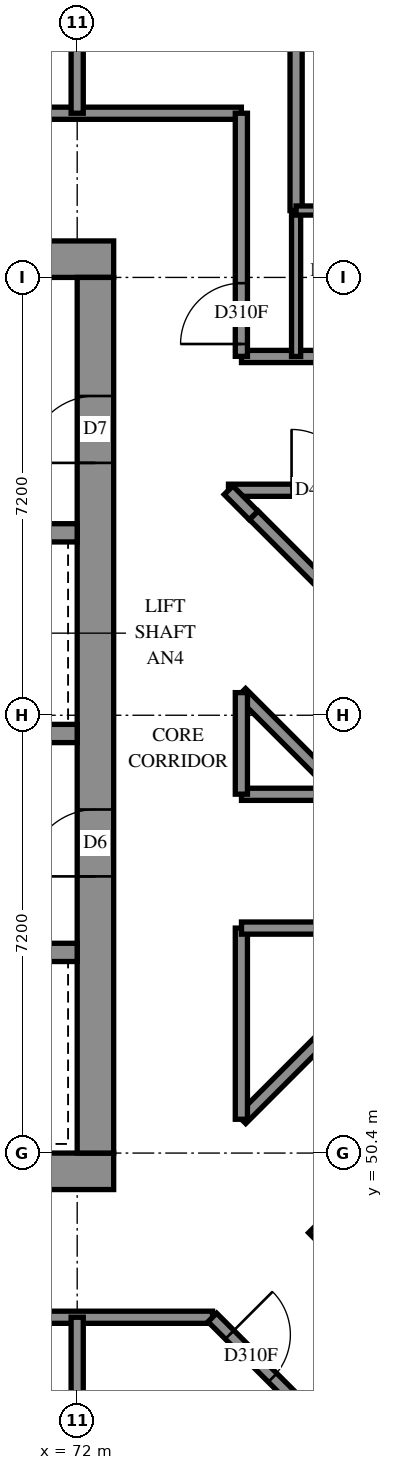
"""IFC4 building model, lengths in metres.
Left out: names, types, materials, properties, quantities, classifications, styles, units other than length and angle.
Written with IfcOpenShell. Run it as: python <this file> out.ifc"""

import sys

from ifc_helpers import new_model, si_unit, direction, frame, frame_2d, origin, place, context, subcontext, project, spatial, rectangle, extrude, element, fill, save


model = new_model("IFC4")
c1 = context("Model", 3, precision=1e-05, world=origin(), true_north=direction((0.0, 1.0)))
c2 = subcontext(c1, "Body", "Model", "MODEL_VIEW")
j1 = project(units=[si_unit("LENGTHUNIT", "METRE"), si_unit("PLANEANGLEUNIT", "RADIAN")], contexts=[c1])
p1 = place(None, origin())
s1 = spatial("IfcSite", under=j1, at=p1, CompositionType="ELEMENT")
p2 = place(p1, origin())
s2 = spatial("IfcBuilding", under=s1, at=p2, CompositionType="ELEMENT")
p3 = place(p2, frame((0.0, 0.0, 159.2)))
s3 = spatial("IfcBuildingStorey", under=s2, at=p3, CompositionType="ELEMENT", Elevation=159.2)
p4 = place(p3, frame((57.0, 50.1, -0.3), z_axis=(0.0, 0.0, 1.0), x_axis=(1.0, 0.0, 0.0)))
e1 = element("IfcWall", 1, at=p4, inside=s3, PredefinedType="SHEAR", context=c2, shape_type="SweptSolid", body=[
    extrude(rectangle(XDim=15.6, YDim=0.6, at=frame_2d((7.8, 0.0))), origin(), (0.0, 0.0, 1.0), 2.7),
])
p5 = place(p3, frame((57.0, 65.1, -0.3), z_axis=(0.0, 0.0, 1.0), x_axis=(1.0, 0.0, 0.0)))
e2 = element("IfcWall", 2, at=p5, inside=s3, PredefinedType="SHEAR", context=c2, shape_type="SweptSolid", body=[
    extrude(rectangle(XDim=15.6, YDim=0.6, at=frame_2d((7.8, 0.0))), origin(), (0.0, 0.0, 1.0), 2.7),
])
p6 = place(p5, frame((10.6, 0.0, 0.3)))
e3 = element("IfcOpeningElement", 3, at=p6, cuts=e2, PredefinedType="OPENING", context=c2, shape_type="SweptSolid", body=[
    extrude(rectangle(XDim=0.8, YDim=2.1, at=frame_2d((0.4, 1.05))), frame((0.0, 0.31, 0.0), z_axis=(0.0, -1.0, 0.0), x_axis=(1.0, 0.0, 0.0)), (0.0, 0.0, 1.0), 0.62),
])
p7 = place(p3, frame((72.3, 50.4, -0.3), z_axis=(0.0, 0.0, 1.0), x_axis=(0.0, 1.0, 0.0)))
e4 = element("IfcWall", 4, at=p7, inside=s3, PredefinedType="SHEAR", context=c2, shape_type="SweptSolid", body=[
    extrude(rectangle(XDim=14.4, YDim=0.6, at=frame_2d((7.2, 0.0))), origin(), (0.0, 0.0, 1.0), 2.7),
])
p8 = place(p7, frame((4.55, 0.0, 0.3)))
e5 = element("IfcOpeningElement", 5, at=p8, cuts=e4, PredefinedType="OPENING", context=c2, shape_type="SweptSolid", body=[
    extrude(rectangle(XDim=1.1, YDim=2.1, at=frame_2d((0.55, 1.05))), frame((0.0, 0.31, 0.0), z_axis=(0.0, -1.0, 0.0), x_axis=(1.0, 0.0, 0.0)), (0.0, 0.0, 1.0), 0.62),
])
p9 = place(p7, frame((11.35, 0.0, 0.3)))
e6 = element("IfcOpeningElement", 6, at=p9, cuts=e4, PredefinedType="OPENING", context=c2, shape_type="SweptSolid", body=[
    extrude(rectangle(XDim=1.1, YDim=2.1, at=frame_2d((0.55, 1.05))), frame((0.0, 0.31, 0.0), z_axis=(0.0, -1.0, 0.0), x_axis=(1.0, 0.0, 0.0)), (0.0, 0.0, 1.0), 0.62),
])
p10 = place(p3, frame((57.6, 53.7, 0.0), z_axis=(0.0, 0.0, 1.0), x_axis=(1.0, 0.0, 0.0)))
e7 = element("IfcWall", 7, at=p10, inside=s3, PredefinedType="SOLIDWALL", context=c2, shape_type="SweptSolid", body=[
    extrude(rectangle(XDim=14.4, YDim=0.3, at=frame_2d((7.2, 0.0))), origin(), (0.0, 0.0, 1.0), 3.1),
])
p11 = place(p10, frame((1.35, 0.0, 0.0)))
e8 = element("IfcOpeningElement", 8, at=p11, cuts=e7, PredefinedType="OPENING", context=c2, shape_type="SweptSolid", body=[
    extrude(rectangle(XDim=0.9, YDim=2.1, at=frame_2d((0.45, 1.05))), frame((0.0, 0.16, 0.0), z_axis=(0.0, -1.0, 0.0), x_axis=(1.0, 0.0, 0.0)), (0.0, 0.0, 1.0), 0.32),
])
p12 = place(p10, frame((4.95, 0.0, 0.0)))
e9 = element("IfcOpeningElement", 9, at=p12, cuts=e7, PredefinedType="OPENING", context=c2, shape_type="SweptSolid", body=[
    extrude(rectangle(XDim=0.9, YDim=2.1, at=frame_2d((0.45, 1.05))), frame((0.0, 0.16, 0.0), z_axis=(0.0, -1.0, 0.0), x_axis=(1.0, 0.0, 0.0)), (0.0, 0.0, 1.0), 0.32),
])
p13 = place(p10, frame((8.55, 0.0, 0.0)))
e10 = element("IfcOpeningElement", 10, at=p13, cuts=e7, PredefinedType="OPENING", context=c2, shape_type="SweptSolid", body=[
    extrude(rectangle(XDim=0.9, YDim=2.1, at=frame_2d((0.45, 1.05))), frame((0.0, 0.16, 0.0), z_axis=(0.0, -1.0, 0.0), x_axis=(1.0, 0.0, 0.0)), (0.0, 0.0, 1.0), 0.32),
])
p14 = place(p10, frame((12.05, 0.0, 0.0)))
e11 = element("IfcOpeningElement", 11, at=p14, cuts=e7, PredefinedType="OPENING", context=c2, shape_type="SweptSolid", body=[
    extrude(rectangle(XDim=1.1, YDim=2.1, at=frame_2d((0.55, 1.05))), frame((0.0, 0.16, 0.0), z_axis=(0.0, -1.0, 0.0), x_axis=(1.0, 0.0, 0.0)), (0.0, 0.0, 1.0), 0.32),
])
p15 = place(p3, frame((57.6, 57.3, 0.0), z_axis=(0.0, 0.0, 1.0), x_axis=(1.0, 0.0, 0.0)))
e12 = element("IfcWall", 12, at=p15, inside=s3, PredefinedType="SOLIDWALL", context=c2, shape_type="SweptSolid", body=[
    extrude(rectangle(XDim=14.4, YDim=0.3, at=frame_2d((7.2, 0.0))), origin(), (0.0, 0.0, 1.0), 3.1),
])
p16 = place(p15, frame((1.25, 0.0, 0.0)))
e13 = element("IfcOpeningElement", 13, at=p16, cuts=e12, PredefinedType="OPENING", context=c2, shape_type="SweptSolid", body=[
    extrude(rectangle(XDim=1.1, YDim=2.1, at=frame_2d((0.55, 1.05))), frame((0.0, 0.16, 0.0), z_axis=(0.0, -1.0, 0.0), x_axis=(1.0, 0.0, 0.0)), (0.0, 0.0, 1.0), 0.32),
])
p17 = place(p15, frame((4.85, 0.0, 0.0)))
e14 = element("IfcOpeningElement", 14, at=p17, cuts=e12, PredefinedType="OPENING", context=c2, shape_type="SweptSolid", body=[
    extrude(rectangle(XDim=1.1, YDim=2.1, at=frame_2d((0.55, 1.05))), frame((0.0, 0.16, 0.0), z_axis=(0.0, -1.0, 0.0), x_axis=(1.0, 0.0, 0.0)), (0.0, 0.0, 1.0), 0.32),
])
p18 = place(p15, frame((8.45, 0.0, 0.0)))
e15 = element("IfcOpeningElement", 15, at=p18, cuts=e12, PredefinedType="OPENING", context=c2, shape_type="SweptSolid", body=[
    extrude(rectangle(XDim=1.1, YDim=2.1, at=frame_2d((0.55, 1.05))), frame((0.0, 0.16, 0.0), z_axis=(0.0, -1.0, 0.0), x_axis=(1.0, 0.0, 0.0)), (0.0, 0.0, 1.0), 0.32),
])
p19 = place(p15, frame((12.05, 0.0, 0.0)))
e16 = element("IfcOpeningElement", 16, at=p19, cuts=e12, PredefinedType="OPENING", context=c2, shape_type="SweptSolid", body=[
    extrude(rectangle(XDim=1.1, YDim=2.1, at=frame_2d((0.55, 1.05))), frame((0.0, 0.16, 0.0), z_axis=(0.0, -1.0, 0.0), x_axis=(1.0, 0.0, 0.0)), (0.0, 0.0, 1.0), 0.32),
])
p20 = place(p3, frame((64.8, 60.6, 0.0), z_axis=(0.0, 0.0, 1.0), x_axis=(1.0, 0.0, 0.0)))
e17 = element("IfcWall", 17, at=p20, inside=s3, PredefinedType="SOLIDWALL", context=c2, shape_type="SweptSolid", body=[
    extrude(rectangle(XDim=7.2, YDim=0.3, at=frame_2d((3.6, 0.0))), origin(), (0.0, 0.0, 1.0), 3.1),
])
p21 = place(p3, frame((76.018, 49.302, -0.3), z_axis=(0.0, 0.0, 1.0), x_axis=(0.7071067812, -0.7071067812, 0.0)))
e18 = element("IfcWall", 18, at=p21, inside=s3, PredefinedType="SHEAR", context=c2, shape_type="SweptSolid", body=[
    extrude(rectangle(XDim=15.6, YDim=0.6, at=frame_2d((7.8, 0.0))), origin(), (0.0, 0.0, 1.0), 2.7),
])
p22 = place(p3, frame((54.9, 67.5, 0.0), z_axis=(0.0, 0.0, 1.0), x_axis=(1.0, 0.0, 0.0)))
e19 = element("IfcWall", 19, at=p22, inside=s3, PredefinedType="PARTITIONING", context=c2, shape_type="SweptSolid", body=[
    extrude(rectangle(XDim=19.8, YDim=0.2, at=frame_2d((9.9, 0.0))), origin(), (0.0, 0.0, 1.0), 3.1),
])
p23 = place(p22, frame((6.599, 0.0, 0.0)))
e20 = element("IfcOpeningElement", 20, at=p23, cuts=e19, PredefinedType="OPENING", context=c2, shape_type="SweptSolid", body=[
    extrude(rectangle(XDim=0.9, YDim=2.1, at=frame_2d((0.45, 1.05))), frame((0.0, 0.11, 0.0), z_axis=(0.0, -1.0, 0.0), x_axis=(1.0, 0.0, 0.0)), (0.0, 0.0, 1.0), 0.22),
])
p24 = place(p22, frame((13.799, 0.0, 0.0)))
e21 = element("IfcOpeningElement", 21, at=p24, cuts=e19, PredefinedType="OPENING", context=c2, shape_type="SweptSolid", body=[
    extrude(rectangle(XDim=0.9, YDim=2.1, at=frame_2d((0.45, 1.05))), frame((0.0, 0.11, 0.0), z_axis=(0.0, -1.0, 0.0), x_axis=(1.0, 0.0, 0.0)), (0.0, 0.0, 1.0), 0.22),
])
p25 = place(p3, frame((54.9, 47.7, 0.0), z_axis=(0.0, 0.0, 1.0), x_axis=(1.0, 0.0, 0.0)))
e22 = element("IfcWall", 22, at=p25, inside=s3, PredefinedType="PARTITIONING", context=c2, shape_type="SweptSolid", body=[
    extrude(rectangle(XDim=19.326, YDim=0.2, at=frame_2d((9.663, 0.0))), origin(), (0.0, 0.0, 1.0), 3.1),
])
p26 = place(p25, frame((6.599, 0.0, 0.0)))
e23 = element("IfcOpeningElement", 23, at=p26, cuts=e22, PredefinedType="OPENING", context=c2, shape_type="SweptSolid", body=[
    extrude(rectangle(XDim=0.9, YDim=2.1, at=frame_2d((0.45, 1.05))), frame((0.0, 0.11, 0.0), z_axis=(0.0, -1.0, 0.0), x_axis=(1.0, 0.0, 0.0)), (0.0, 0.0, 1.0), 0.22),
])
p27 = place(p25, frame((14.101, 0.0, 0.0)))
e24 = element("IfcOpeningElement", 24, at=p27, cuts=e22, PredefinedType="OPENING", context=c2, shape_type="SweptSolid", body=[
    extrude(rectangle(XDim=0.9, YDim=2.1, at=frame_2d((0.45, 1.05))), frame((0.0, 0.11, 0.0), z_axis=(0.0, -1.0, 0.0), x_axis=(1.0, 0.0, 0.0)), (0.0, 0.0, 1.0), 0.22),
])
p28 = place(p3, frame((75.6, 65.9, 0.0), z_axis=(0.0, 0.0, 1.0), x_axis=(0.0, 1.0, 0.0)))
e25 = element("IfcWall", 25, at=p28, inside=s3, PredefinedType="PARTITIONING", context=c2, shape_type="SweptSolid", body=[
    extrude(rectangle(XDim=6.897, YDim=0.2, at=frame_2d((3.448, 0.0))), origin(), (0.0, 0.0, 1.0), 3.1),
])
p29 = place(p3, frame((74.903, 60.889, 0.0), z_axis=(0.0, 0.0, 1.0), x_axis=(0.7071067812, -0.7071067812, 0.0)))
e26 = element("IfcWall", 26, at=p29, inside=s3, PredefinedType="PARTITIONING", context=c2, shape_type="SweptSolid", body=[
    extrude(rectangle(XDim=6.081, YDim=0.2, at=frame_2d((3.041, 0.0))), origin(), (0.0, 0.0, 1.0), 3.1),
])
p30 = place(p3, frame((74.488, 61.3, 0.0), z_axis=(0.0, 0.0, 1.0), x_axis=(1.0, 0.0, 0.0)))
e27 = element("IfcWall", 27, at=p30, inside=s3, PredefinedType="PARTITIONING", context=c2, shape_type="SweptSolid", body=[
    extrude(rectangle(XDim=4.712, YDim=0.2, at=frame_2d((2.356, 0.0))), origin(), (0.0, 0.0, 1.0), 3.1),
])
p31 = place(p30, frame((1.037, 0.0, 0.0)))
e28 = element("IfcOpeningElement", 28, at=p31, cuts=e27, PredefinedType="OPENING", context=c2, shape_type="SweptSolid", body=[
    extrude(rectangle(XDim=1.0, YDim=2.1, at=frame_2d((0.5, 1.05))), frame((0.0, 0.11, 0.0), z_axis=(0.0, -1.0, 0.0), x_axis=(1.0, 0.0, 0.0)), (0.0, 0.0, 1.0), 0.22),
])
p32 = place(p3, frame((74.223, 47.697, 0.0), z_axis=(0.0, 0.0, 1.0), x_axis=(0.7071067812, -0.7071067812, 0.0)))
e29 = element("IfcWall", 29, at=p32, inside=s3, PredefinedType="PARTITIONING", context=c2, shape_type="SweptSolid", body=[
    extrude(rectangle(XDim=4.63, YDim=0.2, at=frame_2d((2.315, 0.0))), origin(), (0.0, 0.0, 1.0), 3.1),
])
p33 = place(p32, frame((0.401, 0.0, 0.0)))
e30 = element("IfcOpeningElement", 30, at=p33, cuts=e29, PredefinedType="OPENING", context=c2, shape_type="SweptSolid", body=[
    extrude(rectangle(XDim=1.0, YDim=2.1, at=frame_2d((0.5, 1.05))), frame((0.0, 0.11, 0.0), z_axis=(0.0, -1.0, 0.0), x_axis=(1.0, 0.0, 0.0)), (0.0, 0.0, 1.0), 0.22),
])
p34 = place(p3, frame((74.702, 63.5, 0.0), z_axis=(0.0, 0.0, 1.0), x_axis=(1.0, 0.0, 0.0)))
e31 = element("IfcWall", 31, at=p34, inside=s3, PredefinedType="PARTITIONING", context=c2, shape_type="SweptSolid", body=[
    extrude(rectangle(XDim=4.498, YDim=0.2, at=frame_2d((2.249, 0.0))), origin(), (0.0, 0.0, 1.0), 3.1),
])
p35 = place(p34, frame((3.046, 0.0, 0.0)))
e32 = element("IfcOpeningElement", 32, at=p35, cuts=e31, PredefinedType="OPENING", context=c2, shape_type="SweptSolid", body=[
    extrude(rectangle(XDim=0.9, YDim=2.1, at=frame_2d((0.45, 1.05))), frame((0.0, 0.11, 0.0), z_axis=(0.0, -1.0, 0.0), x_axis=(1.0, 0.0, 0.0)), (0.0, 0.0, 1.0), 0.22),
])
p36 = place(p3, frame((74.701, 50.957, 0.0), z_axis=(0.0, 0.0, 1.0), x_axis=(0.7071067812, 0.7071067812, 0.0)))
e33 = element("IfcWall", 33, at=p36, inside=s3, PredefinedType="PARTITIONING", context=c2, shape_type="SweptSolid", body=[
    extrude(rectangle(XDim=4.444, YDim=0.2, at=frame_2d((2.222, 0.0))), origin(), (0.0, 0.0, 1.0), 3.1),
])
p37 = place(p3, frame((72.0, 67.5, 0.0), z_axis=(0.0, 0.0, 1.0), x_axis=(0.0, 1.0, 0.0)))
e34 = element("IfcWall", 34, at=p37, inside=s3, PredefinedType="PARTITIONING", context=c2, shape_type="SweptSolid", body=[
    extrude(rectangle(XDim=4.05, YDim=0.2, at=frame_2d((2.025, 0.0))), origin(), (0.0, 0.0, 1.0), 3.1),
])
p38 = place(p3, frame((74.7, 63.502, 0.0), z_axis=(0.0, 0.0, 1.0), x_axis=(0.0, 1.0, 0.0)))
e35 = element("IfcWall", 35, at=p38, inside=s3, PredefinedType="PARTITIONING", context=c2, shape_type="SweptSolid", body=[
    extrude(rectangle(XDim=3.998, YDim=0.2, at=frame_2d((1.999, 0.0))), origin(), (0.0, 0.0, 1.0), 3.1),
])
p39 = place(p38, frame((0.203, 0.0, 0.0)))
e36 = element("IfcOpeningElement", 36, at=p39, cuts=e35, PredefinedType="OPENING", context=c2, shape_type="SweptSolid", body=[
    extrude(rectangle(XDim=1.0, YDim=2.1, at=frame_2d((0.5, 1.05))), frame((0.0, 0.11, 0.0), z_axis=(0.0, -1.0, 0.0), x_axis=(1.0, 0.0, 0.0)), (0.0, 0.0, 1.0), 0.22),
])
p40 = place(p3, frame((72.0, 43.756, 0.0), z_axis=(0.0, 0.0, 1.0), x_axis=(0.0, 1.0, 0.0)))
e37 = element("IfcWall", 37, at=p40, inside=s3, PredefinedType="PARTITIONING", context=c2, shape_type="SweptSolid", body=[
    extrude(rectangle(XDim=3.944, YDim=0.2, at=frame_2d((1.972, 0.0))), origin(), (0.0, 0.0, 1.0), 3.1),
])
p41 = place(p3, frame((74.7, 50.956, 0.0), z_axis=(0.0, 0.0, 1.0), x_axis=(0.0, 1.0, 0.0)))
e38 = element("IfcWall", 38, at=p41, inside=s3, PredefinedType="PARTITIONING", context=c2, shape_type="SweptSolid", body=[
    extrude(rectangle(XDim=3.144, YDim=0.2, at=frame_2d((1.572, 0.0))), origin(), (0.0, 0.0, 1.0), 3.1),
])
p42 = place(p3, frame((74.702, 54.1, 0.0), z_axis=(0.0, 0.0, 1.0), x_axis=(1.0, 0.0, 0.0)))
e39 = element("IfcWall", 39, at=p42, inside=s3, PredefinedType="PARTITIONING", context=c2, shape_type="SweptSolid", body=[
    extrude(rectangle(XDim=3.142, YDim=0.2, at=frame_2d((1.571, 0.0))), origin(), (0.0, 0.0, 1.0), 3.1),
])
p43 = place(p3, frame((75.6, 63.5, 0.0), z_axis=(0.0, 0.0, 1.0), x_axis=(0.0, 1.0, 0.0)))
e40 = element("IfcWall", 40, at=p43, inside=s3, PredefinedType="PARTITIONING", context=c2, shape_type="SweptSolid", body=[
    extrude(rectangle(XDim=2.4, YDim=0.15, at=frame_2d((1.2, 0.0))), origin(), (0.0, 0.0, 1.0), 3.1),
])
p44 = place(p3, frame((74.699, 57.969, 0.0), z_axis=(0.0, 0.0, 1.0), x_axis=(0.7071067812, -0.7071067812, 0.0)))
e41 = element("IfcWall", 41, at=p44, inside=s3, PredefinedType="PARTITIONING", context=c2, shape_type="SweptSolid", body=[
    extrude(rectangle(XDim=2.362, YDim=0.2, at=frame_2d((1.181, 0.0))), origin(), (0.0, 0.0, 1.0), 3.1),
])
p45 = place(p3, frame((75.6, 65.9, 0.0), z_axis=(0.0, 0.0, 1.0), x_axis=(1.0, 0.0, 0.0)))
e42 = element("IfcWall", 42, at=p45, inside=s3, PredefinedType="PARTITIONING", context=c2, shape_type="SweptSolid", body=[
    extrude(rectangle(XDim=1.9, YDim=0.15, at=frame_2d((0.95, 0.0))), origin(), (0.0, 0.0, 1.0), 3.1),
])
p46 = place(p45, frame((0.607, 0.0, 0.0)))
e43 = element("IfcOpeningElement", 43, at=p46, cuts=e42, PredefinedType="OPENING", context=c2, shape_type="SweptSolid", body=[
    extrude(rectangle(XDim=0.8, YDim=2.1, at=frame_2d((0.4, 1.05))), frame((0.0, 0.085, 0.0), z_axis=(0.0, -1.0, 0.0), x_axis=(1.0, 0.0, 0.0)), (0.0, 0.0, 1.0), 0.17),
])
for number, where, z_axis, x_axis in (
    (44, (74.702, 56.3, 0.0), (0.0, 0.0, 1.0), (1.0, 0.0, 0.0)),
    (45, (74.7, 56.302, 0.0), (0.0, 0.0, 1.0), (0.0, 1.0, 0.0)),
):
    element("IfcWall", number, at=place(p3, frame(where, z_axis=z_axis, x_axis=x_axis)), inside=s3, PredefinedType="PARTITIONING", context=c2, shape_type="SweptSolid", body=[
        extrude(rectangle(XDim=1.67, YDim=0.2, at=frame_2d((0.835, 0.0))), origin(), (0.0, 0.0, 1.0), 3.1),
    ])
p47 = place(p3, frame((74.489, 61.301, 0.0), z_axis=(0.0, 0.0, 1.0), x_axis=(0.7053925905, -0.7088168263, 0.0)))
e46 = element("IfcWall", 46, at=p47, inside=s3, PredefinedType="PARTITIONING", context=c2, shape_type="SweptSolid", body=[
    extrude(rectangle(XDim=0.584, YDim=0.2, at=frame_2d((0.292, 0.0))), origin(), (0.0, 0.0, 1.0), 3.1),
])
p48 = place(p8, origin())
e47 = element("IfcDoor", 47, at=p48, inside=s3, OperationType="DOUBLE_DOOR_SINGLE_SWING", PredefinedType="DOOR", context=c2, shape_type="SweptSolid", body=[
    extrude(rectangle(XDim=1.1, YDim=2.1, at=frame_2d((0.55, 1.05))), frame((0.0, 0.025, 0.0), z_axis=(0.0, -1.0, 0.0), x_axis=(1.0, 0.0, 0.0)), (0.0, 0.0, 1.0), 0.05),
])
fill(e5, e47)
p49 = place(p9, origin())
e48 = element("IfcDoor", 48, at=p49, inside=s3, OperationType="SINGLE_SWING_RIGHT", PredefinedType="DOOR", context=c2, shape_type="SweptSolid", body=[
    extrude(rectangle(XDim=1.1, YDim=2.1, at=frame_2d((0.55, 1.05))), frame((0.0, 0.025, 0.0), z_axis=(0.0, -1.0, 0.0), x_axis=(1.0, 0.0, 0.0)), (0.0, 0.0, 1.0), 0.05),
])
fill(e6, e48)
p50 = place(p39, origin())
e49 = element("IfcDoor", 49, at=p50, inside=s3, OperationType="SINGLE_SWING_RIGHT", PredefinedType="DOOR", context=c2, shape_type="SweptSolid", body=[
    extrude(rectangle(XDim=1.0, YDim=2.1, at=frame_2d((0.5, 1.05))), frame((0.0, 0.025, 0.0), z_axis=(0.0, -1.0, 0.0), x_axis=(1.0, 0.0, 0.0)), (0.0, 0.0, 1.0), 0.05),
])
fill(e36, e49)
p51 = place(p31, origin())
e50 = element("IfcDoor", 50, at=p51, inside=s3, OperationType="SINGLE_SWING_RIGHT", PredefinedType="DOOR", context=c2, shape_type="SweptSolid", body=[
    extrude(rectangle(XDim=1.0, YDim=2.1, at=frame_2d((0.5, 1.05))), frame((0.0, 0.025, 0.0), z_axis=(0.0, -1.0, 0.0), x_axis=(1.0, 0.0, 0.0)), (0.0, 0.0, 1.0), 0.05),
])
fill(e28, e50)
p52 = place(p33, origin())
e51 = element("IfcDoor", 51, at=p52, inside=s3, OperationType="SINGLE_SWING_LEFT", PredefinedType="DOOR", context=c2, shape_type="SweptSolid", body=[
    extrude(rectangle(XDim=1.0, YDim=2.1, at=frame_2d((0.5, 1.05))), frame((0.0, 0.025, 0.0), z_axis=(0.0, -1.0, 0.0), x_axis=(1.0, 0.0, 0.0)), (0.0, 0.0, 1.0), 0.05),
])
fill(e30, e51)
save(model, sys.argv[1])
